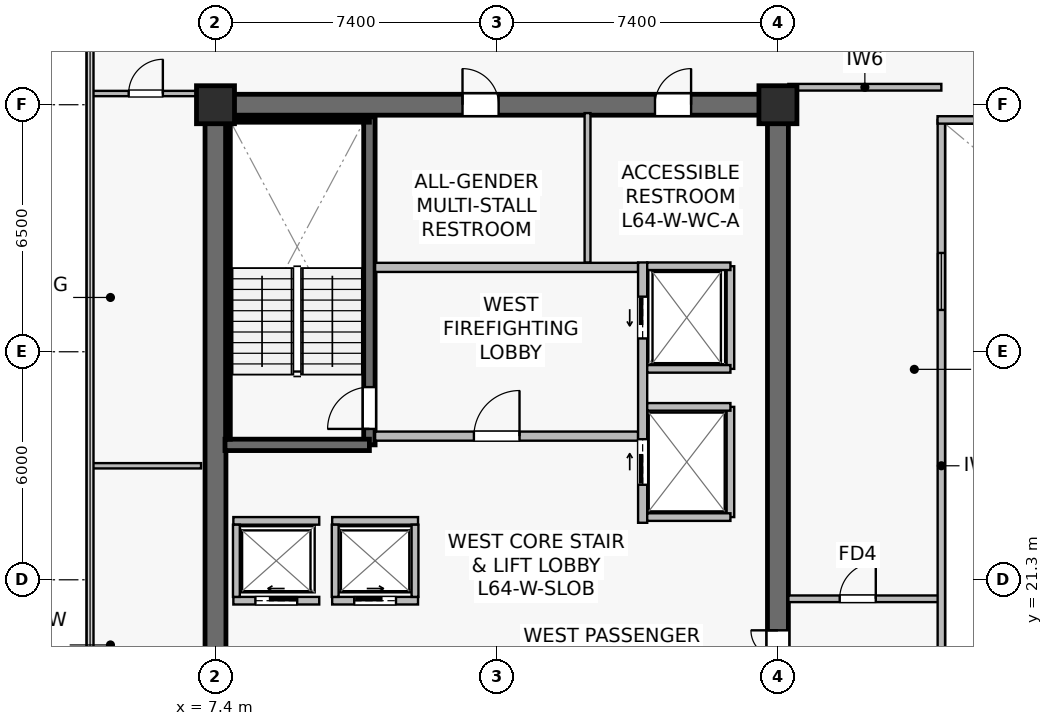
"""IFC4 building model, lengths in metres.
Left out: names, types, materials, properties, quantities, classifications, styles, units other than length and angle.
Written with IfcOpenShell. Run it as: python <this file> out.ifc"""

import sys

from ifc_helpers import new_model, si_unit, direction, frame, frame_2d, origin, origin_2d, place, context, subcontext, project, spatial, rectangle, extrude, source, transform, mapped, element, fill, save


model = new_model("IFC4")
c1 = context("Model", 3, precision=1e-05, world=origin(), true_north=direction((0.0, 1.0)))
c2 = subcontext(c1, "Body", "Model", "MODEL_VIEW")
j1 = project(units=[si_unit("LENGTHUNIT", "METRE"), si_unit("PLANEANGLEUNIT", "RADIAN")], contexts=[c1])
p1 = place(None, origin())
s1 = spatial("IfcSite", under=j1, at=p1, CompositionType="ELEMENT")
p2 = place(p1, origin())
s2 = spatial("IfcBuilding", under=s1, at=p2, CompositionType="ELEMENT")
p3 = place(p2, frame((0.0, 0.0, 267.0)))
s3 = spatial("IfcBuildingStorey", under=s2, at=p3, CompositionType="ELEMENT", Elevation=267.0)
p4 = place(p3, frame((7.125, 33.8, 0.0), z_axis=(0.0, 0.0, 1.0), x_axis=(1.0, 0.0, 0.0)))
e1 = element("IfcWall", 1, at=p4, inside=s3, PredefinedType="SHEAR", context=c2, shape_type="SweptSolid", body=[
    extrude(rectangle(XDim=15.35, YDim=0.55, at=frame_2d((7.675, 0.0))), origin(), (0.0, 0.0, 1.0), 3.8),
])
p5 = place(p4, frame((6.775, 0.0, 0.0)))
e2 = element("IfcOpeningElement", 2, at=p5, cuts=e1, PredefinedType="OPENING", context=c2, shape_type="SweptSolid", body=[
    extrude(rectangle(XDim=0.95, YDim=2.15, at=frame_2d((0.475, 1.075))), frame((0.0, 0.285, 0.0), z_axis=(0.0, -1.0, 0.0), x_axis=(1.0, 0.0, 0.0)), (0.0, 0.0, 1.0), 0.57),
])
p6 = place(p4, frame((11.84, 0.0, 0.0)))
e3 = element("IfcOpeningElement", 3, at=p6, cuts=e1, PredefinedType="OPENING", context=c2, shape_type="SweptSolid", body=[
    extrude(rectangle(XDim=0.95, YDim=2.15, at=frame_2d((0.475, 1.075))), frame((0.0, 0.285, 0.0), z_axis=(0.0, -1.0, 0.0), x_axis=(1.0, 0.0, 0.0)), (0.0, 0.0, 1.0), 0.57),
])
p7 = place(p3, frame((7.4, 15.075, 0.0), z_axis=(0.0, 0.0, 1.0), x_axis=(0.0, 1.0, 0.0)))
e4 = element("IfcWall", 4, at=p7, inside=s3, PredefinedType="SHEAR", context=c2, shape_type="SweptSolid", body=[
    extrude(rectangle(XDim=18.45, YDim=0.55, at=frame_2d((9.225, 0.0))), origin(), (0.0, 0.0, 1.0), 3.8),
])
p8 = place(p3, frame((22.2, 15.075, 0.0), z_axis=(0.0, 0.0, 1.0), x_axis=(0.0, 1.0, 0.0)))
e5 = element("IfcWall", 5, at=p8, inside=s3, PredefinedType="SHEAR", context=c2, shape_type="SweptSolid", body=[
    extrude(rectangle(XDim=18.45, YDim=0.55, at=frame_2d((9.225, 0.0))), origin(), (0.0, 0.0, 1.0), 3.8),
])
p9 = place(p8, frame((3.475, 0.0, 0.0)))
e6 = element("IfcOpeningElement", 6, at=p9, cuts=e5, PredefinedType="OPENING", context=c2, shape_type="SweptSolid", body=[
    extrude(rectangle(XDim=1.42, YDim=2.2, at=frame_2d((0.71, 1.1))), frame((0.0, 0.285, 0.0), z_axis=(0.0, -1.0, 0.0), x_axis=(1.0, 0.0, 0.0)), (0.0, 0.0, 1.0), 0.57),
])
p10 = place(p3, frame((11.45, 24.85, 0.0), z_axis=(0.0, 0.0, 1.0), x_axis=(0.0, 1.0, 0.0)))
e7 = element("IfcWall", 7, at=p10, inside=s3, PredefinedType="SHEAR", context=c2, shape_type="SweptSolid", body=[
    extrude(rectangle(XDim=8.63, YDim=0.3, at=frame_2d((4.315, 0.0))), origin(), (0.0, 0.0, 1.0), 3.8),
])
p11 = place(p10, frame((0.42, 0.0, 0.0)))
e8 = element("IfcOpeningElement", 8, at=p11, cuts=e7, PredefinedType="OPENING", context=c2, shape_type="SweptSolid", body=[
    extrude(rectangle(XDim=1.1, YDim=2.15, at=frame_2d((0.55, 1.075))), frame((0.0, 0.16, 0.0), z_axis=(0.0, -1.0, 0.0), x_axis=(1.0, 0.0, 0.0)), (0.0, 0.0, 1.0), 0.32),
])
p12 = place(p3, frame((7.65, 24.85, 0.0), z_axis=(0.0, 0.0, 1.0), x_axis=(1.0, 0.0, 0.0)))
e9 = element("IfcWall", 9, at=p12, inside=s3, PredefinedType="SHEAR", context=c2, shape_type="SweptSolid", body=[
    extrude(rectangle(XDim=3.8, YDim=0.3, at=frame_2d((1.9, 0.0))), origin(), (0.0, 0.0, 1.0), 3.8),
])
p13 = place(p3, frame((7.73, 33.4, 0.0), z_axis=(0.0, 0.0, 1.0), x_axis=(1.0, 0.0, 0.0)))
e10 = element("IfcWall", 10, at=p13, inside=s3, PredefinedType="SOLIDWALL", context=c2, shape_type="SweptSolid", body=[
    extrude(rectangle(XDim=3.72, YDim=0.12, at=frame_2d((1.86, 0.0))), origin(), (0.0, 0.0, 1.0), 3.8),
])
p14 = place(p3, frame((7.73, 25.0, 0.0), z_axis=(0.0, 0.0, 1.0), x_axis=(0.0, 1.0, 0.0)))
e11 = element("IfcWall", 11, at=p14, inside=s3, PredefinedType="SOLIDWALL", context=c2, shape_type="SweptSolid", body=[
    extrude(rectangle(XDim=8.32, YDim=0.12, at=frame_2d((4.16, 0.0))), origin(), (0.0, 0.0, 1.0), 3.8),
])
m1 = source(origin(), c2, "Body", "SweptSolid", [
    extrude(rectangle(XDim=1.0, YDim=1.0, at=origin_2d()), origin(), (0.0, 0.0, 1.0), 4.1),
])
for number, where, z_axis, x_axis in (
    (12, (7.4, 33.8, 0.0), (0.0, 0.0, 1.0), (1.0, 0.0, 0.0)),
    (13, (22.2, 33.8, 0.0), (0.0, 0.0, 1.0), (1.0, 0.0, 0.0)),
):
    element("IfcColumn", number, at=place(p3, frame(where, z_axis=z_axis, x_axis=x_axis)), inside=s3, PredefinedType="COLUMN", context=c2, shape_type="MappedRepresentation", body=[
        mapped(m1, transform((0.0, 0.0, 0.0), scale=1.0)),
    ])
p15 = place(p3, frame((11.6, 25.08, 0.0), z_axis=(0.0, 0.0, 1.0), x_axis=(1.0, 0.0, 0.0)))
e14 = element("IfcWall", 14, at=p15, inside=s3, PredefinedType="SOLIDWALL", context=c2, shape_type="SweptSolid", body=[
    extrude(rectangle(XDim=6.92, YDim=0.24, at=frame_2d((3.46, 0.0))), origin(), (0.0, 0.0, 1.0), 3.197),
])
p16 = place(p15, frame((2.6, 0.0, 0.0)))
e15 = element("IfcOpeningElement", 15, at=p16, cuts=e14, PredefinedType="OPENING", context=c2, shape_type="SweptSolid", body=[
    extrude(rectangle(XDim=1.2, YDim=2.16, at=frame_2d((0.6, 1.08))), frame((0.0, 0.13, 0.0), z_axis=(0.0, -1.0, 0.0), x_axis=(1.0, 0.0, 0.0)), (0.0, 0.0, 1.0), 0.26),
])
p17 = place(p3, frame((11.6, 29.52, 0.0), z_axis=(0.0, 0.0, 1.0), x_axis=(1.0, 0.0, 0.0)))
e16 = element("IfcWall", 16, at=p17, inside=s3, PredefinedType="SOLIDWALL", context=c2, shape_type="SweptSolid", body=[
    extrude(rectangle(XDim=6.92, YDim=0.24, at=frame_2d((3.46, 0.0))), origin(), (0.0, 0.0, 1.0), 3.197),
])
p18 = place(p3, frame((18.64, 22.8, 0.0), z_axis=(0.0, 0.0, 1.0), x_axis=(0.0, 1.0, 0.0)))
e17 = element("IfcWall", 17, at=p18, inside=s3, PredefinedType="SOLIDWALL", context=c2, shape_type="SweptSolid", body=[
    extrude(rectangle(XDim=6.85, YDim=0.24, at=frame_2d((3.425, 0.0))), origin(), (0.0, 0.0, 1.0), 2.935),
])
p19 = place(p18, frame((4.85, 0.0, 0.0)))
e18 = element("IfcOpeningElement", 18, at=p19, cuts=e17, PredefinedType="OPENING", context=c2, shape_type="SweptSolid", body=[
    extrude(rectangle(XDim=1.1, YDim=2.22, at=frame_2d((0.55, 1.11))), frame((0.0, 0.13, 0.0), z_axis=(0.0, -1.0, 0.0), x_axis=(1.0, 0.0, 0.0)), (0.0, 0.0, 1.0), 0.26),
])
p20 = place(p18, frame((1.0, 0.0, 0.0)))
e19 = element("IfcOpeningElement", 19, at=p20, cuts=e17, PredefinedType="OPENING", context=c2, shape_type="SweptSolid", body=[
    extrude(rectangle(XDim=1.2, YDim=2.22, at=frame_2d((0.6, 1.11))), frame((0.0, 0.13, 0.0), z_axis=(0.0, -1.0, 0.0), x_axis=(1.0, 0.0, 0.0)), (0.0, 0.0, 1.0), 0.26),
])
p21 = place(p3, frame((7.87, 20.75, 0.0), z_axis=(0.0, 0.0, 1.0), x_axis=(1.0, 0.0, 0.0)))
e20 = element("IfcWall", 20, at=p21, inside=s3, PredefinedType="SOLIDWALL", context=c2, shape_type="SweptSolid", body=[
    extrude(rectangle(XDim=2.26, YDim=0.2, at=frame_2d((1.13, 0.0))), origin(), (0.0, 0.0, 1.0), 3.8),
])
p22 = place(p21, frame((0.58, 0.0, 0.0)))
e21 = element("IfcOpeningElement", 21, at=p22, cuts=e20, PredefinedType="OPENING", context=c2, shape_type="SweptSolid", body=[
    extrude(rectangle(XDim=1.1, YDim=2.22, at=frame_2d((0.55, 1.11))), frame((0.0, 0.11, 0.0), z_axis=(0.0, -1.0, 0.0), x_axis=(1.0, 0.0, 0.0)), (0.0, 0.0, 1.0), 0.22),
])
p23 = place(p3, frame((7.87, 22.85, 0.0), z_axis=(0.0, 0.0, 1.0), x_axis=(1.0, 0.0, 0.0)))
e22 = element("IfcWall", 22, at=p23, inside=s3, PredefinedType="SOLIDWALL", context=c2, shape_type="SweptSolid", body=[
    extrude(rectangle(XDim=2.26, YDim=0.2, at=frame_2d((1.13, 0.0))), origin(), (0.0, 0.0, 1.0), 3.8),
])
p24 = place(p3, frame((7.95, 20.85, 0.0), z_axis=(0.0, 0.0, 1.0), x_axis=(0.0, 1.0, 0.0)))
e23 = element("IfcWall", 23, at=p24, inside=s3, PredefinedType="SOLIDWALL", context=c2, shape_type="SweptSolid", body=[
    extrude(rectangle(XDim=1.9, YDim=0.18, at=frame_2d((0.95, 0.0))), origin(), (0.0, 0.0, 1.0), 3.8),
])
p25 = place(p3, frame((10.47, 20.75, 0.0), z_axis=(0.0, 0.0, 1.0), x_axis=(1.0, 0.0, 0.0)))
e24 = element("IfcWall", 24, at=p25, inside=s3, PredefinedType="SOLIDWALL", context=c2, shape_type="SweptSolid", body=[
    extrude(rectangle(XDim=2.26, YDim=0.2, at=frame_2d((1.13, 0.0))), origin(), (0.0, 0.0, 1.0), 3.8),
])
p26 = place(p25, frame((0.58, 0.0, 0.0)))
e25 = element("IfcOpeningElement", 25, at=p26, cuts=e24, PredefinedType="OPENING", context=c2, shape_type="SweptSolid", body=[
    extrude(rectangle(XDim=1.1, YDim=2.22, at=frame_2d((0.55, 1.11))), frame((0.0, 0.11, 0.0), z_axis=(0.0, -1.0, 0.0), x_axis=(1.0, 0.0, 0.0)), (0.0, 0.0, 1.0), 0.22),
])
p27 = place(p3, frame((10.47, 22.85, 0.0), z_axis=(0.0, 0.0, 1.0), x_axis=(1.0, 0.0, 0.0)))
e26 = element("IfcWall", 26, at=p27, inside=s3, PredefinedType="SOLIDWALL", context=c2, shape_type="SweptSolid", body=[
    extrude(rectangle(XDim=2.26, YDim=0.2, at=frame_2d((1.13, 0.0))), origin(), (0.0, 0.0, 1.0), 3.8),
])
for number, where, z_axis, x_axis in (
    (27, (10.55, 20.85, 0.0), (0.0, 0.0, 1.0), (0.0, 1.0, 0.0)),
    (28, (12.65, 20.85, 0.0), (0.0, 0.0, 1.0), (0.0, 1.0, 0.0)),
):
    element("IfcWall", number, at=place(p3, frame(where, z_axis=z_axis, x_axis=x_axis)), inside=s3, PredefinedType="SOLIDWALL", context=c2, shape_type="SweptSolid", body=[
        extrude(rectangle(XDim=1.9, YDim=0.18, at=frame_2d((0.95, 0.0))), origin(), (0.0, 0.0, 1.0), 3.8),
    ])
p28 = place(p3, frame((20.95, 26.85, 0.0), z_axis=(0.0, 0.0, 1.0), x_axis=(0.0, 1.0, 0.0)))
e29 = element("IfcWall", 29, at=p28, inside=s3, PredefinedType="SOLIDWALL", context=c2, shape_type="SweptSolid", body=[
    extrude(rectangle(XDim=2.7, YDim=0.2, at=frame_2d((1.35, 0.0))), origin(), (0.0, 0.0, 1.0), 3.8),
])
p29 = place(p3, frame((18.76, 29.55, 0.0), z_axis=(0.0, 0.0, 1.0), x_axis=(1.0, 0.0, 0.0)))
e30 = element("IfcWall", 30, at=p29, inside=s3, PredefinedType="SOLIDWALL", context=c2, shape_type="SweptSolid", body=[
    extrude(rectangle(XDim=2.19, YDim=0.2, at=frame_2d((1.095, 0.0))), origin(), (0.0, 0.0, 1.0), 3.8),
])
p30 = place(p3, frame((18.76, 26.85, 0.0), z_axis=(0.0, 0.0, 1.0), x_axis=(1.0, 0.0, 0.0)))
e31 = element("IfcWall", 31, at=p30, inside=s3, PredefinedType="SOLIDWALL", context=c2, shape_type="SweptSolid", body=[
    extrude(rectangle(XDim=2.19, YDim=0.2, at=frame_2d((1.095, 0.0))), origin(), (0.0, 0.0, 1.0), 3.197),
])
p31 = place(p3, frame((20.95, 22.95, 0.0), z_axis=(0.0, 0.0, 1.0), x_axis=(0.0, 1.0, 0.0)))
e32 = element("IfcWall", 32, at=p31, inside=s3, PredefinedType="SOLIDWALL", context=c2, shape_type="SweptSolid", body=[
    extrude(rectangle(XDim=2.9, YDim=0.2, at=frame_2d((1.45, 0.0))), origin(), (0.0, 0.0, 1.0), 2.935),
])
for number, where, z_axis, x_axis in (
    (33, (18.76, 25.85, 0.0), (0.0, 0.0, 1.0), (1.0, 0.0, 0.0)),
    (34, (18.76, 22.95, 0.0), (0.0, 0.0, 1.0), (1.0, 0.0, 0.0)),
):
    element("IfcWall", number, at=place(p3, frame(where, z_axis=z_axis, x_axis=x_axis)), inside=s3, PredefinedType="SOLIDWALL", context=c2, shape_type="SweptSolid", body=[
        extrude(rectangle(XDim=2.19, YDim=0.2, at=frame_2d((1.095, 0.0))), origin(), (0.0, 0.0, 1.0), 3.8),
    ])
p32 = place(p3, frame((17.19, 29.65, 0.0), z_axis=(0.0, 0.0, 1.0), x_axis=(0.0, 1.0, 0.0)))
e35 = element("IfcWall", 35, at=p32, inside=s3, PredefinedType="PLUMBINGWALL", context=c2, shape_type="SweptSolid", body=[
    extrude(rectangle(XDim=3.93, YDim=0.155, at=frame_2d((1.965, 0.0))), origin(), (0.0, 0.0, 1.0), 3.8),
])
p33 = place(p3, frame((22.475, 34.26, 0.0), z_axis=(0.0, 0.0, 1.0), x_axis=(1.0, 0.0, 0.0)))
e36 = element("IfcWall", 36, at=p33, inside=s3, PredefinedType="PARTITIONING", context=c2, shape_type="SweptSolid", body=[
    extrude(rectangle(XDim=4.025, YDim=0.175, at=frame_2d((2.012, 0.0))), origin(), (0.0, 0.0, 1.0), 3.535),
])
p34 = place(p3, frame((22.475, 20.8, 0.0), z_axis=(0.0, 0.0, 1.0), x_axis=(1.0, 0.0, 0.0)))
e37 = element("IfcWall", 37, at=p34, inside=s3, PredefinedType="PARTITIONING", context=c2, shape_type="SweptSolid", body=[
    extrude(rectangle(XDim=4.025, YDim=0.175, at=frame_2d((2.012, 0.0))), origin(), (0.0, 0.0, 1.0), 3.8),
])
p35 = place(p34, frame((1.35, 0.0, 0.0)))
e38 = element("IfcOpeningElement", 38, at=p35, cuts=e37, PredefinedType="OPENING", context=c2, shape_type="SweptSolid", body=[
    extrude(rectangle(XDim=0.95, YDim=2.15, at=frame_2d((0.475, 1.075))), frame((0.0, 0.098, 0.0), z_axis=(0.0, -1.0, 0.0), x_axis=(1.0, 0.0, 0.0)), (0.0, 0.0, 1.0), 0.195),
])
p36 = place(p3, frame((26.5, 15.2, 0.0), z_axis=(0.0, 0.0, 1.0), x_axis=(0.0, 1.0, 0.0)))
e39 = element("IfcWall", 39, at=p36, inside=s3, PredefinedType="SOLIDWALL", context=c2, shape_type="SweptSolid", body=[
    extrude(rectangle(XDim=18.2, YDim=0.195, at=frame_2d((9.1, 0.0))), origin(), (0.0, 0.0, 1.0), 3.8),
])
p37 = place(p36, frame((1.8, 0.0, 0.9)))
e40 = element("IfcOpeningElement", 40, at=p37, cuts=e39, PredefinedType="OPENING", context=c2, shape_type="SweptSolid", body=[
    extrude(rectangle(XDim=1.5, YDim=1.4, at=frame_2d((0.75, 0.7))), frame((0.0, 0.107, 0.0), z_axis=(0.0, -1.0, 0.0), x_axis=(1.0, 0.0, 0.0)), (0.0, 0.0, 1.0), 0.215),
])
p38 = place(p36, frame((13.2, 0.0, 0.9)))
e41 = element("IfcOpeningElement", 41, at=p38, cuts=e39, PredefinedType="OPENING", context=c2, shape_type="SweptSolid", body=[
    extrude(rectangle(XDim=1.5, YDim=1.4, at=frame_2d((0.75, 0.7))), frame((0.0, 0.107, 0.0), z_axis=(0.0, -1.0, 0.0), x_axis=(1.0, 0.0, 0.0)), (0.0, 0.0, 1.0), 0.215),
])
p39 = place(p3, frame((26.4, 33.4, 0.0), z_axis=(0.0, 0.0, 1.0), x_axis=(1.0, 0.0, 0.0)))
e42 = element("IfcWall", 42, at=p39, inside=s3, PredefinedType="SOLIDWALL", context=c2, shape_type="SweptSolid", body=[
    extrude(rectangle(XDim=22.0, YDim=0.195, at=frame_2d((11.0, 0.0))), origin(), (0.0, 0.0, 1.0), 3.8),
])
p40 = place(p3, frame((4.11, 24.3, 0.0), z_axis=(0.0, 0.0, 1.0), x_axis=(1.0, 0.0, 0.0)))
e43 = element("IfcWall", 43, at=p40, inside=s3, PredefinedType="PARTITIONING", context=c2, shape_type="SweptSolid", body=[
    extrude(rectangle(XDim=2.91, YDim=0.14, at=frame_2d((1.455, 0.0))), origin(), (0.0, 0.0, 1.0), 3.8),
])
p41 = place(p3, frame((4.11, 34.095, 0.0), z_axis=(0.0, 0.0, 1.0), x_axis=(1.0, 0.0, 0.0)))
e44 = element("IfcWall", 44, at=p41, inside=s3, PredefinedType="PARTITIONING", context=c2, shape_type="SweptSolid", body=[
    extrude(rectangle(XDim=2.91, YDim=0.14, at=frame_2d((1.455, 0.0))), origin(), (0.0, 0.0, 1.0), 3.8),
])
p42 = place(p41, frame((1.005, 0.0, 0.0)))
e45 = element("IfcOpeningElement", 45, at=p42, cuts=e44, PredefinedType="OPENING", context=c2, shape_type="SweptSolid", body=[
    extrude(rectangle(XDim=0.9, YDim=2.1, at=frame_2d((0.45, 1.05))), frame((0.0, 0.08, 0.0), z_axis=(0.0, -1.0, 0.0), x_axis=(1.0, 0.0, 0.0)), (0.0, 0.0, 1.0), 0.16),
])
m2 = source(origin(), c2, "Body", "SweptSolid", [
    extrude(rectangle(XDim=1.5, YDim=1.4, at=frame_2d((0.75, 0.7))), frame((0.0, 0.03, 0.0), z_axis=(0.0, -1.0, 0.0), x_axis=(1.0, 0.0, 0.0)), (0.0, 0.0, 1.0), 0.06),
])
p43 = place(p38, origin())
e46 = element("IfcWindow", 46, at=p43, inside=s3, PartitioningType="SINGLE_PANEL", PredefinedType="WINDOW", context=c2, shape_type="MappedRepresentation", body=[
    mapped(m2, transform((0.0, 0.0, 0.0), scale=1.0)),
])
fill(e41, e46)
m3 = source(origin(), c2, "Body", "SweptSolid", [
    extrude(rectangle(XDim=1.1, YDim=2.15, at=frame_2d((0.55, 1.075))), frame((0.0, 0.025, 0.0), z_axis=(0.0, -1.0, 0.0), x_axis=(1.0, 0.0, 0.0)), (0.0, 0.0, 1.0), 0.05),
])
p44 = place(p11, origin())
e47 = element("IfcDoor", 47, at=p44, inside=s3, OperationType="SINGLE_SWING_LEFT", PredefinedType="DOOR", context=c2, shape_type="MappedRepresentation", body=[
    mapped(m3, transform((0.0, 0.0, 0.0), scale=1.0)),
])
fill(e8, e47)
m4 = source(origin(), c2, "Body", "SweptSolid", [
    extrude(rectangle(XDim=1.2, YDim=2.16, at=frame_2d((0.6, 1.08))), frame((0.0, 0.025, 0.0), z_axis=(0.0, -1.0, 0.0), x_axis=(1.0, 0.0, 0.0)), (0.0, 0.0, 1.0), 0.05),
])
p45 = place(p16, origin())
e48 = element("IfcDoor", 48, at=p45, inside=s3, OperationType="SINGLE_SWING_RIGHT", PredefinedType="DOOR", context=c2, shape_type="MappedRepresentation", body=[
    mapped(m4, transform((0.0, 0.0, 0.0), scale=1.0)),
])
fill(e15, e48)
m5 = source(origin(), c2, "Body", "SweptSolid", [
    extrude(rectangle(XDim=1.1, YDim=2.22, at=frame_2d((0.55, 1.11))), frame((0.0, 0.025, 0.0), z_axis=(0.0, -1.0, 0.0), x_axis=(1.0, 0.0, 0.0)), (0.0, 0.0, 1.0), 0.05),
])
p46 = place(p22, origin())
e49 = element("IfcDoor", 49, at=p46, inside=s3, OperationType="SLIDING_TO_LEFT", PredefinedType="USERDEFINED", context=c2, shape_type="MappedRepresentation", body=[
    mapped(m5, transform((0.0, 0.0, 0.0), scale=1.0)),
])
fill(e21, e49)
p47 = place(p26, origin())
e50 = element("IfcDoor", 50, at=p47, inside=s3, OperationType="SLIDING_TO_RIGHT", PredefinedType="USERDEFINED", context=c2, shape_type="MappedRepresentation", body=[
    mapped(m5, transform((0.0, 0.0, 0.0), scale=1.0)),
])
fill(e25, e50)
p48 = place(p19, origin())
e51 = element("IfcDoor", 51, at=p48, inside=s3, OperationType="SLIDING_TO_LEFT", PredefinedType="USERDEFINED", context=c2, shape_type="MappedRepresentation", body=[
    mapped(m5, transform((0.0, 0.0, 0.0), scale=1.0)),
])
fill(e18, e51)
m6 = source(origin(), c2, "Body", "SweptSolid", [
    extrude(rectangle(XDim=1.2, YDim=2.22, at=frame_2d((0.6, 1.11))), frame((0.0, 0.025, 0.0), z_axis=(0.0, -1.0, 0.0), x_axis=(1.0, 0.0, 0.0)), (0.0, 0.0, 1.0), 0.05),
])
p49 = place(p20, origin())
e52 = element("IfcDoor", 52, at=p49, inside=s3, OperationType="SLIDING_TO_RIGHT", PredefinedType="USERDEFINED", context=c2, shape_type="MappedRepresentation", body=[
    mapped(m6, transform((0.0, 0.0, 0.0), scale=1.0)),
])
fill(e19, e52)
m7 = source(origin(), c2, "Body", "SweptSolid", [
    extrude(rectangle(XDim=1.42, YDim=2.2, at=frame_2d((0.71, 1.1))), frame((0.0, 0.025, 0.0), z_axis=(0.0, -1.0, 0.0), x_axis=(1.0, 0.0, 0.0)), (0.0, 0.0, 1.0), 0.05),
])
p50 = place(p9, origin())
e53 = element("IfcDoor", 53, at=p50, inside=s3, OperationType="DOUBLE_DOOR_SINGLE_SWING", PredefinedType="DOOR", context=c2, shape_type="MappedRepresentation", body=[
    mapped(m7, transform((0.0, 0.0, 0.0), scale=1.0)),
])
fill(e6, e53)
m8 = source(origin(), c2, "Body", "SweptSolid", [
    extrude(rectangle(XDim=0.95, YDim=2.15, at=frame_2d((0.475, 1.075))), frame((0.0, 0.025, 0.0), z_axis=(0.0, -1.0, 0.0), x_axis=(1.0, 0.0, 0.0)), (0.0, 0.0, 1.0), 0.05),
])
p51 = place(p5, origin())
e54 = element("IfcDoor", 54, at=p51, inside=s3, OperationType="SINGLE_SWING_LEFT", PredefinedType="DOOR", context=c2, shape_type="MappedRepresentation", body=[
    mapped(m8, transform((0.0, 0.0, 0.0), scale=1.0)),
])
fill(e2, e54)
p52 = place(p6, origin())
e55 = element("IfcDoor", 55, at=p52, inside=s3, OperationType="SINGLE_SWING_RIGHT", PredefinedType="DOOR", context=c2, shape_type="MappedRepresentation", body=[
    mapped(m8, transform((0.0, 0.0, 0.0), scale=1.0)),
])
fill(e3, e55)
p53 = place(p35, origin())
e56 = element("IfcDoor", 56, at=p53, inside=s3, OperationType="SINGLE_SWING_RIGHT", PredefinedType="DOOR", context=c2, shape_type="MappedRepresentation", body=[
    mapped(m8, transform((0.0, 0.0, 0.0), scale=1.0)),
])
fill(e38, e56)
m9 = source(origin(), c2, "Body", "SweptSolid", [
    extrude(rectangle(XDim=0.9, YDim=2.1, at=frame_2d((0.45, 1.05))), frame((0.0, 0.025, 0.0), z_axis=(0.0, -1.0, 0.0), x_axis=(1.0, 0.0, 0.0)), (0.0, 0.0, 1.0), 0.05),
])
p54 = place(p42, origin())
e57 = element("IfcDoor", 57, at=p54, inside=s3, OperationType="SINGLE_SWING_RIGHT", PredefinedType="DOOR", context=c2, shape_type="MappedRepresentation", body=[
    mapped(m9, transform((0.0, 0.0, 0.0), scale=1.0)),
])
fill(e45, e57)
save(model, sys.argv[1])
